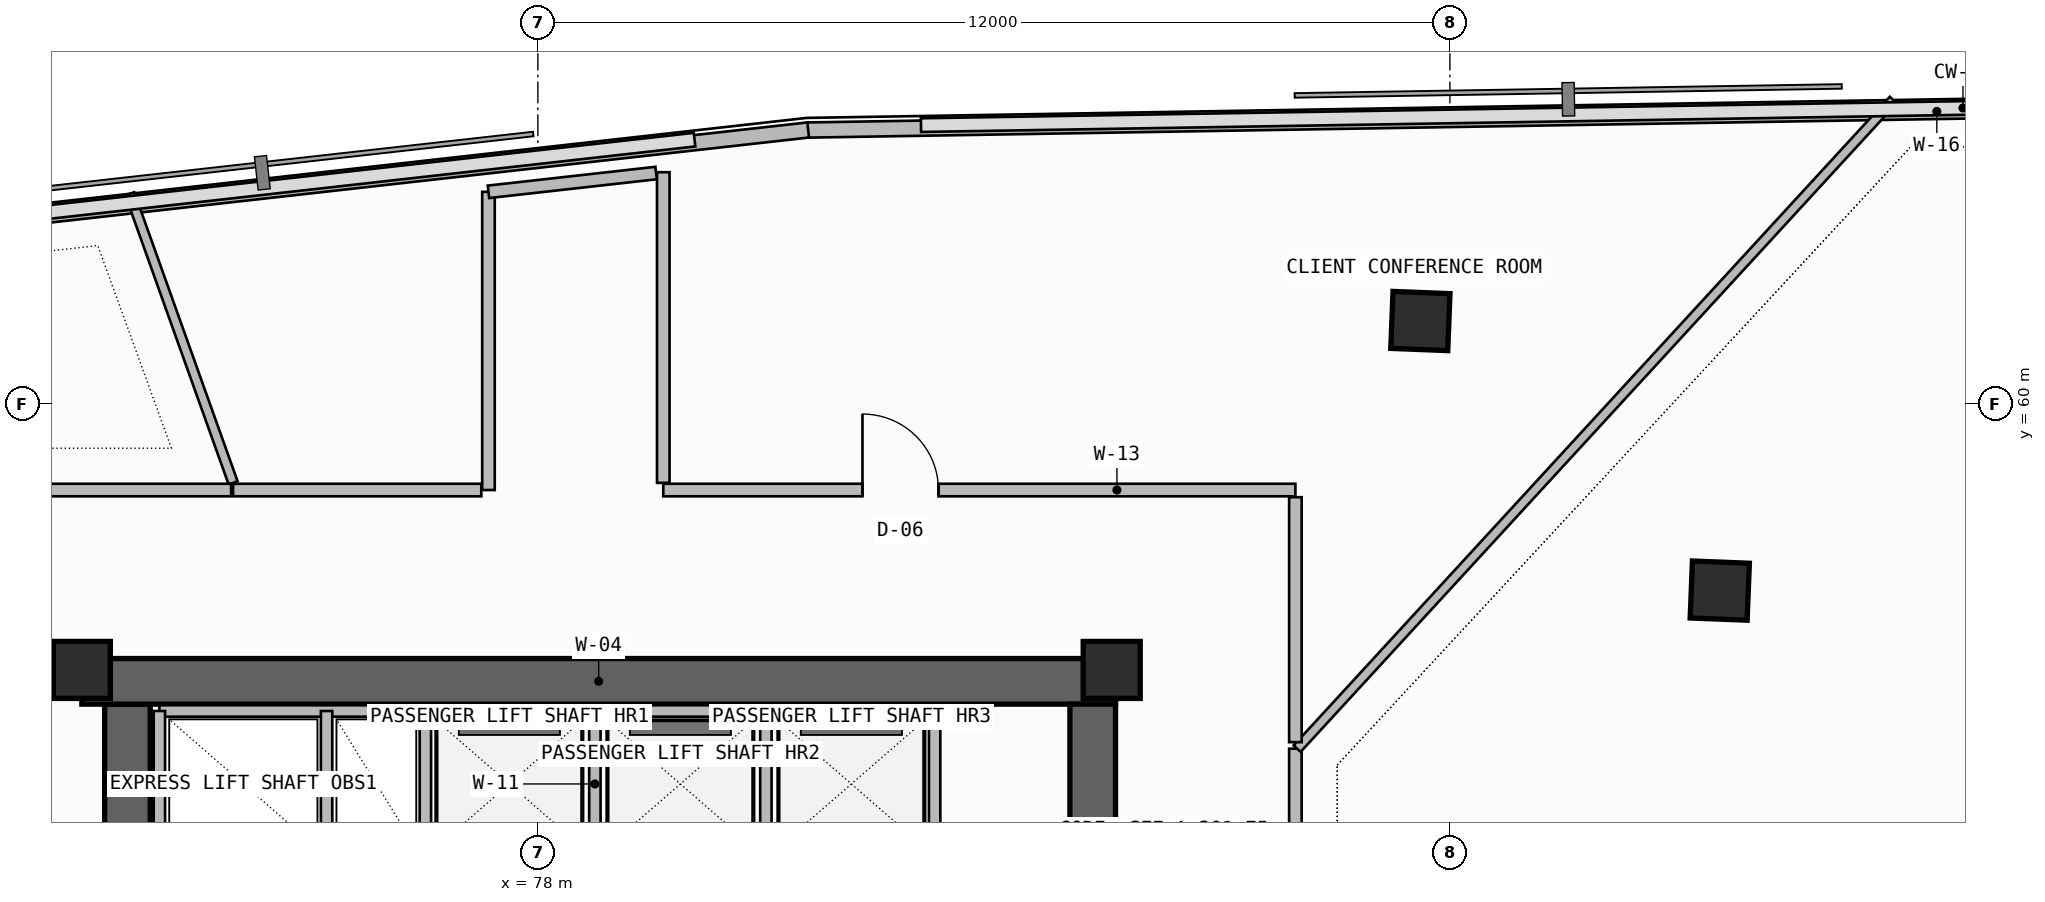
"""IFC4 building model, lengths in metres.
Left out: names, types, materials, properties, quantities, classifications, styles, units other than length and angle.
Written with IfcOpenShell. Run it as: python <this file> out.ifc"""

import sys

from ifc_helpers import new_model, si_unit, direction, frame, frame_2d, origin, origin_2d, place, context, subcontext, project, spatial, rectangle, extrude, element, fill, save


model = new_model("IFC4")
c1 = context("Model", 3, precision=1e-05, world=origin(), true_north=direction((0.0, 1.0)))
c2 = subcontext(c1, "Body", "Model", "MODEL_VIEW")
j1 = project(units=[si_unit("LENGTHUNIT", "METRE"), si_unit("PLANEANGLEUNIT", "RADIAN")], contexts=[c1])
p1 = place(None, origin())
s1 = spatial("IfcSite", under=j1, at=p1, CompositionType="ELEMENT")
p2 = place(p1, origin())
s2 = spatial("IfcBuilding", under=s1, at=p2, CompositionType="ELEMENT")
p3 = place(p2, frame((0.0, 0.0, 267.78)))
s3 = spatial("IfcBuildingStorey", under=s2, at=p3, CompositionType="ELEMENT", Elevation=267.78)
p4 = place(p3, frame((72.6, 43.35, -0.26), z_axis=(0.0, 0.0, 1.0), x_axis=(0.0, 1.0, 0.0)))
e1 = element("IfcWall", 1, at=p4, inside=s3, PredefinedType="SHEAR", context=c2, shape_type="SweptSolid", body=[
    extrude(rectangle(XDim=12.7, YDim=0.6, at=frame_2d((6.35, 0.0))), origin(), (0.0, 0.0, 1.0), 3.52),
])
p5 = place(p4, frame((1.35, 0.0, 0.26)))
e2 = element("IfcOpeningElement", 2, at=p5, cuts=e1, PredefinedType="OPENING", context=c2, shape_type="SweptSolid", body=[
    extrude(rectangle(XDim=1.2, YDim=2.2, at=frame_2d((0.6, 1.1))), frame((0.0, 0.31, 0.0), z_axis=(0.0, -1.0, 0.0), x_axis=(1.0, 0.0, 0.0)), (0.0, 0.0, 1.0), 0.62),
])
p6 = place(p3, frame((72.0, 56.35, -0.26), z_axis=(0.0, 0.0, 1.0), x_axis=(1.0, 0.0, 0.0)))
e3 = element("IfcWall", 3, at=p6, inside=s3, PredefinedType="SHEAR", context=c2, shape_type="SweptSolid", body=[
    extrude(rectangle(XDim=13.6, YDim=0.6, at=frame_2d((6.8, 0.0))), origin(), (0.0, 0.0, 1.0), 3.52),
])
p7 = place(p3, frame((85.3, 47.6, -0.26), z_axis=(0.0, 0.0, 1.0), x_axis=(0.0, 1.0, 0.0)))
e4 = element("IfcWall", 4, at=p7, inside=s3, PredefinedType="SHEAR", context=c2, shape_type="SweptSolid", body=[
    extrude(rectangle(XDim=8.45, YDim=0.6, at=frame_2d((4.225, 0.0))), origin(), (0.0, 0.0, 1.0), 3.52),
])
for number, where, z_axis, x_axis in (
    (5, (72.0, 56.5, 0.0), (0.0, 0.0, 1.0), (1.0, 0.0, 0.0)),
    (6, (85.55, 56.5, 0.0), (0.0, 0.0, 1.0), (1.0, 0.0, 0.0)),
    (7, (93.55, 57.544, 0.0), (0.0, 0.0, 1.0), (0.039, 0.999, 0.0)),
    (8, (89.611, 61.09, 0.0), (0.0, 0.0, 1.0), (0.039, 0.999, 0.0)),
):
    element("IfcColumn", number, at=place(p3, frame(where, z_axis=z_axis, x_axis=x_axis)), inside=s3, PredefinedType="COLUMN", context=c2, shape_type="SweptSolid", body=[
        extrude(rectangle(XDim=0.75, YDim=0.75, at=origin_2d()), origin(), (0.0, 0.0, 1.0), 3.52),
    ])
p8 = place(p3, frame((111.271, 64.092, 0.0), z_axis=(0.0, 0.0, 1.0), x_axis=(-0.999864741935, -0.016446818413, 0.0)))
e9 = element("IfcWall", 9, at=p8, inside=s3, PredefinedType="PARAPET", context=c2, shape_type="SweptSolid", body=[
    extrude(rectangle(XDim=29.733, YDim=0.2, at=frame_2d((14.866, 0.0))), origin(), (0.0, 0.0, 1.0), 1.15),
])
p9 = place(p3, frame((81.557, 63.604, 0.0), z_axis=(0.0, 0.0, 1.0), x_axis=(-0.993776455024, -0.111392806945, 0.0)))
e10 = element("IfcWall", 10, at=p9, inside=s3, PredefinedType="PARAPET", context=c2, shape_type="SweptSolid", body=[
    extrude(rectangle(XDim=24.891, YDim=0.2, at=frame_2d((12.446, 0.0))), origin(), (0.0, 0.0, 1.0), 1.15),
])
p10 = place(p3, frame((73.02, 55.96, 0.0), z_axis=(0.0, 0.0, 1.0), x_axis=(1.0, 0.0, 0.0)))
e11 = element("IfcWall", 11, at=p10, inside=s3, PredefinedType="SOLIDWALL", context=c2, shape_type="SweptSolid", body=[
    extrude(rectangle(XDim=3.5, YDim=0.15, at=frame_2d((1.75, 0.0))), origin(), (0.0, 0.0, 1.0), 3.26),
])
p11 = place(p3, frame((73.02, 54.02, 0.0), z_axis=(0.0, 0.0, 1.0), x_axis=(0.0, 1.0, 0.0)))
e12 = element("IfcWall", 12, at=p11, inside=s3, PredefinedType="PLUMBINGWALL", context=c2, shape_type="SweptSolid", body=[
    extrude(rectangle(XDim=1.94, YDim=0.15, at=frame_2d((0.97, 0.0))), origin(), (0.0, 0.0, 1.0), 3.26),
])
p12 = place(p3, frame((76.52, 54.02, 0.0), z_axis=(0.0, 0.0, 1.0), x_axis=(0.0, 1.0, 0.0)))
e13 = element("IfcWall", 13, at=p12, inside=s3, PredefinedType="SOLIDWALL", context=c2, shape_type="SweptSolid", body=[
    extrude(rectangle(XDim=1.94, YDim=0.15, at=frame_2d((0.97, 0.0))), origin(), (0.0, 0.0, 1.0), 3.26),
])
p13 = place(p3, frame((75.22, 54.02, 0.0), z_axis=(0.0, 0.0, 1.0), x_axis=(0.0, 1.0, 0.0)))
e14 = element("IfcWall", 14, at=p13, inside=s3, PredefinedType="PLUMBINGWALL", context=c2, shape_type="SweptSolid", body=[
    extrude(rectangle(XDim=1.94, YDim=0.15, at=frame_2d((0.97, 0.0))), origin(), (0.0, 0.0, 1.0), 3.26),
])
for number, where, z_axis, x_axis in (
    (15, (78.75, 54.02, 0.0), (0.0, 0.0, 1.0), (0.0, 1.0, 0.0)),
    (16, (81.0, 54.02, 0.0), (0.0, 0.0, 1.0), (0.0, 1.0, 0.0)),
):
    element("IfcWall", number, at=place(p3, frame(where, z_axis=z_axis, x_axis=x_axis)), inside=s3, PredefinedType="PLUMBINGWALL", context=c2, shape_type="SweptSolid", body=[
        extrude(rectangle(XDim=1.96, YDim=0.15, at=frame_2d((0.98, 0.0))), origin(), (0.0, 0.0, 1.0), 3.26),
    ])
p14 = place(p3, frame((83.22, 54.02, 0.0), z_axis=(0.0, 0.0, 1.0), x_axis=(0.0, 1.0, 0.0)))
e17 = element("IfcWall", 17, at=p14, inside=s3, PredefinedType="SOLIDWALL", context=c2, shape_type="SweptSolid", body=[
    extrude(rectangle(XDim=1.96, YDim=0.15, at=frame_2d((0.98, 0.0))), origin(), (0.0, 0.0, 1.0), 3.26),
])
p15 = place(p3, frame((76.52, 55.96, 0.0), z_axis=(0.0, 0.0, 1.0), x_axis=(1.0, 0.0, 0.0)))
e18 = element("IfcWall", 18, at=p15, inside=s3, PredefinedType="SOLIDWALL", context=c2, shape_type="SweptSolid", body=[
    extrude(rectangle(XDim=6.7, YDim=0.15, at=frame_2d((3.35, 0.0))), origin(), (0.0, 0.0, 1.0), 3.26),
])
p16 = place(p3, frame((87.967, 47.62, 0.0), z_axis=(0.0, 0.0, 1.0), x_axis=(0.0, 1.0, 0.0)))
e19 = element("IfcWall", 19, at=p16, inside=s3, PredefinedType="PARTITIONING", context=c2, shape_type="SweptSolid", body=[
    extrude(rectangle(XDim=7.844, YDim=0.165, at=frame_2d((3.922, 0.0))), origin(), (0.0, 0.0, 1.0), 3.26),
])
p17 = place(p16, frame((3.422, 0.0, 0.0)))
e20 = element("IfcOpeningElement", 20, at=p17, cuts=e19, PredefinedType="OPENING", context=c2, shape_type="SweptSolid", body=[
    extrude(rectangle(XDim=1.0, YDim=2.2, at=frame_2d((0.5, 1.1))), frame((0.0, 0.093, 0.0), z_axis=(0.0, -1.0, 0.0), x_axis=(1.0, 0.0, 0.0)), (0.0, 0.0, 1.0), 0.185),
])
p18 = place(p3, frame((87.99, 55.464, 0.0), z_axis=(0.0, 0.0, 1.0), x_axis=(0.676751206436, 0.736211793295, 0.0)))
e21 = element("IfcWall", 21, at=p18, inside=s3, PredefinedType="PARTITIONING", context=c2, shape_type="SweptSolid", body=[
    extrude(rectangle(XDim=11.591, YDim=0.125, at=frame_2d((5.795, 0.0))), origin(), (0.0, 0.0, 1.0), 2.645),
])
p19 = place(p3, frame((87.967, 58.867, 0.0), z_axis=(0.0, 0.0, 1.0), x_axis=(-1.0, 0.0, 0.0)))
e22 = element("IfcWall", 22, at=p19, inside=s3, PredefinedType="PARTITIONING", context=c2, shape_type="SweptSolid", body=[
    extrude(rectangle(XDim=8.317, YDim=0.165, at=frame_2d((4.158, 0.0))), origin(), (0.0, 0.0, 1.0), 2.745),
])
p20 = place(p19, frame((4.696, 0.0, 0.0)))
e23 = element("IfcOpeningElement", 23, at=p20, cuts=e22, PredefinedType="OPENING", context=c2, shape_type="SweptSolid", body=[
    extrude(rectangle(XDim=1.0, YDim=2.2, at=frame_2d((0.5, 1.1))), frame((0.0, 0.093, 0.0), z_axis=(0.0, -1.0, 0.0), x_axis=(1.0, 0.0, 0.0)), (0.0, 0.0, 1.0), 0.185),
])
p21 = place(p3, frame((79.65, 58.961, 0.0), z_axis=(0.0, 0.0, 1.0), x_axis=(0.0, 1.0, 0.0)))
e24 = element("IfcWall", 24, at=p21, inside=s3, PredefinedType="PARTITIONING", context=c2, shape_type="SweptSolid", body=[
    extrude(rectangle(XDim=4.087, YDim=0.165, at=frame_2d((2.043, 0.0))), origin(), (0.0, 0.0, 1.0), 3.26),
])
p22 = place(p3, frame((77.35, 62.79, 0.0), z_axis=(0.0, 0.0, 1.0), x_axis=(0.0, -1.0, 0.0)))
e25 = element("IfcWall", 25, at=p22, inside=s3, PredefinedType="PARTITIONING", context=c2, shape_type="SweptSolid", body=[
    extrude(rectangle(XDim=3.923, YDim=0.165, at=frame_2d((1.962, 0.0))), origin(), (0.0, 0.0, 1.0), 3.26),
])
p23 = place(p3, frame((87.967, 55.55, 0.0), z_axis=(0.0, 0.0, 1.0), x_axis=(0.0, 1.0, 0.0)))
e26 = element("IfcWall", 26, at=p23, inside=s3, PredefinedType="PARTITIONING", context=c2, shape_type="SweptSolid", body=[
    extrude(rectangle(XDim=3.222, YDim=0.165, at=frame_2d((1.611, 0.0))), origin(), (0.0, 0.0, 1.0), 2.745),
])
p24 = place(p3, frame((77.256, 58.867, 0.0), z_axis=(0.0, 0.0, 1.0), x_axis=(-1.0, 0.0, 0.0)))
e27 = element("IfcWall", 27, at=p24, inside=s3, PredefinedType="PARTITIONING", context=c2, shape_type="SweptSolid", body=[
    extrude(rectangle(XDim=3.266, YDim=0.165, at=frame_2d((1.633, 0.0))), origin(), (0.0, 0.0, 1.0), 3.26),
])
p25 = place(p3, frame((79.555, 63.037, 0.0), z_axis=(0.0, 0.0, 1.0), x_axis=(-0.993770518254, -0.11144575833, 0.0)))
e28 = element("IfcWall", 28, at=p25, inside=s3, PredefinedType="PARTITIONING", context=c2, shape_type="SweptSolid", body=[
    extrude(rectangle(XDim=2.219, YDim=0.165, at=frame_2d((1.11, 0.0))), origin(), (0.0, 0.0, 1.0), 3.26),
])
p26 = place(p3, frame((73.99, 58.961, 0.0), z_axis=(0.0, 0.0, 1.0), x_axis=(-0.336520199653, 0.941676247564, 0.0)))
e29 = element("IfcWall", 29, at=p26, inside=s3, PredefinedType="PARTITIONING", context=c2, shape_type="SweptSolid", body=[
    extrude(rectangle(XDim=4.039, YDim=0.125, at=frame_2d((2.02, 0.0))), origin(), (0.0, 0.0, 1.0), 3.26),
])
p27 = place(p3, frame((73.964, 58.867, 0.0), z_axis=(0.0, 0.0, 1.0), x_axis=(-1.0, 0.0, 0.0)))
e30 = element("IfcWall", 30, at=p27, inside=s3, PredefinedType="PARTITIONING", context=c2, shape_type="SweptSolid", body=[
    extrude(rectangle(XDim=4.286, YDim=0.165, at=frame_2d((2.143, 0.0))), origin(), (0.0, 0.0, 1.0), 3.26),
])
p28 = place(p20, frame((1.0, 0.0, 0.0), z_axis=(0.0, 0.0, 1.0), x_axis=(-1.0, 0.0, 0.0)))
e31 = element("IfcDoor", 31, at=p28, inside=s3, OperationType="SINGLE_SWING_LEFT", PredefinedType="DOOR", context=c2, shape_type="SweptSolid", body=[
    extrude(rectangle(XDim=1.0, YDim=2.2, at=frame_2d((0.5, 1.1))), frame((0.0, 0.025, 0.0), z_axis=(0.0, -1.0, 0.0), x_axis=(1.0, 0.0, 0.0)), (0.0, 0.0, 1.0), 0.05),
])
fill(e23, e31)
save(model, sys.argv[1])
